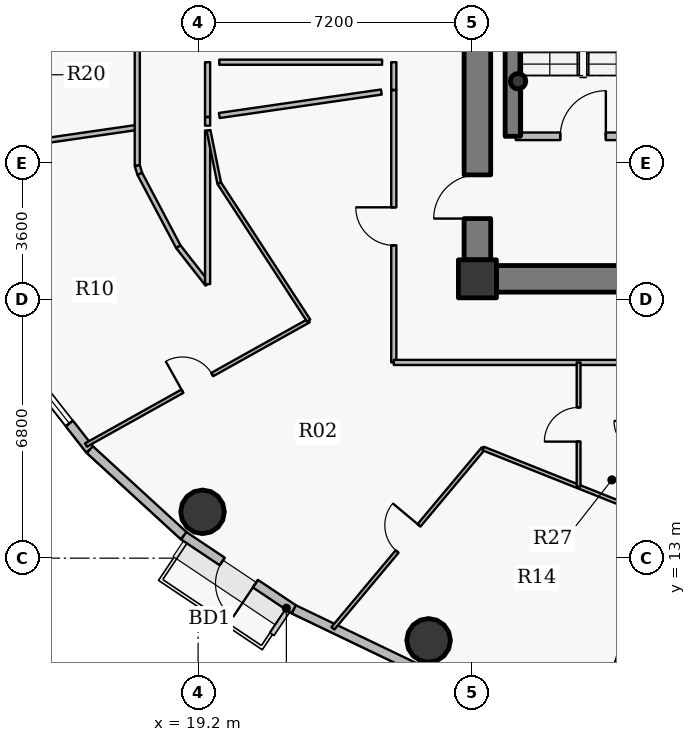
"""IFC4 building model, lengths in metres.
Left out: names, types, materials, properties, quantities, classifications, styles, units other than length and angle.
Written with IfcOpenShell. Run it as: python <this file> out.ifc"""

import sys

from ifc_helpers import new_model, si_unit, direction, frame, frame_2d, origin, origin_2d, place, context, subcontext, project, spatial, rectangle, hollow_circle, extrude, source, transform, mapped, element, fill, save


model = new_model("IFC4")
c1 = context("Model", 3, precision=1e-05, world=origin(), true_north=direction((0.0, 1.0)))
c2 = subcontext(c1, "Body", "Model", "MODEL_VIEW")
j1 = project(units=[si_unit("LENGTHUNIT", "METRE"), si_unit("PLANEANGLEUNIT", "RADIAN")], contexts=[c1])
p1 = place(None, origin())
s1 = spatial("IfcSite", under=j1, at=p1, CompositionType="ELEMENT")
p2 = place(p1, origin())
s2 = spatial("IfcBuilding", under=s1, at=p2, CompositionType="ELEMENT")
p3 = place(p2, frame((0.0, 0.0, 236.55)))
s3 = spatial("IfcBuildingStorey", under=s2, at=p3, CompositionType="ELEMENT", Elevation=236.55)
p4 = place(p3, frame((26.55, 20.35, 0.0), z_axis=(0.0, 0.0, 1.0), x_axis=(1.0, 0.0, 0.0)))
e1 = element("IfcColumn", 1, at=p4, inside=s3, PredefinedType="COLUMN", context=c2, shape_type="SweptSolid", body=[
    extrude(rectangle(XDim=1.0, YDim=1.0, at=origin_2d()), origin(), (0.0, 0.0, 1.0), 3.75),
])
p5 = place(p3, frame((27.48, 24.1, 0.0), z_axis=(0.0, 0.0, 1.0), x_axis=(0.0, 1.0, 0.0)))
e2 = element("IfcWall", 2, at=p5, inside=s3, PredefinedType="SHEAR", context=c2, shape_type="SweptSolid", body=[
    extrude(rectangle(XDim=8.6, YDim=0.4, at=frame_2d((4.3, 0.0))), origin(), (0.0, 0.0, 1.0), 3.75),
])
p6 = place(p3, frame((27.62, 25.55, 0.0), z_axis=(0.0, 0.0, 1.0), x_axis=(1.0, 0.0, 0.0)))
e3 = element("IfcColumn", 3, at=p6, inside=s3, PredefinedType="COLUMN", context=c2, shape_type="SweptSolid", body=[
    extrude(hollow_circle(Radius=0.203, WallThickness=0.016, at=origin_2d()), origin(), (0.0, 0.0, 1.0), 3.75),
])
p7 = place(p3, frame((44.95, 20.35, 0.0), z_axis=(0.0, 0.0, 1.0), x_axis=(-1.0, 0.0, 0.0)))
e4 = element("IfcWall", 4, at=p7, inside=s3, PredefinedType="SHEAR", context=c2, shape_type="SweptSolid", body=[
    extrude(rectangle(XDim=17.9, YDim=0.7, at=frame_2d((8.95, 0.0))), origin(), (0.0, 0.0, 1.0), 3.05),
])
p8 = place(p7, frame((9.7, 0.0, 0.0)))
e5 = element("IfcOpeningElement", 5, at=p8, cuts=e4, PredefinedType="OPENING", context=c2, shape_type="SweptSolid", body=[
    extrude(rectangle(XDim=1.15, YDim=2.15, at=origin_2d()), frame((0.575, 0.36, 1.075), z_axis=(0.0, -1.0, 0.0), x_axis=(1.0, 0.0, 0.0)), (0.0, 0.0, 1.0), 0.72),
])
p9 = place(p3, frame((26.55, 20.85, 0.0), z_axis=(0.0, 0.0, 1.0), x_axis=(0.0, 1.0, 0.0)))
e6 = element("IfcWall", 6, at=p9, inside=s3, PredefinedType="SHEAR", context=c2, shape_type="SweptSolid", body=[
    extrude(rectangle(XDim=12.3, YDim=0.7, at=frame_2d((6.15, 0.0))), origin(), (0.0, 0.0, 1.0), 3.05),
])
p10 = place(p9, frame((1.085, 0.0, 0.0)))
e7 = element("IfcOpeningElement", 7, at=p10, cuts=e6, PredefinedType="OPENING", context=c2, shape_type="SweptSolid", body=[
    extrude(rectangle(XDim=1.15, YDim=2.15, at=origin_2d()), frame((0.575, 0.36, 1.075), z_axis=(0.0, -1.0, 0.0), x_axis=(1.0, 0.0, 0.0)), (0.0, 0.0, 1.0), 0.72),
])
for number, where, z_axis, x_axis in (
    (8, (19.317, 14.219, 0.0), (0.0, 0.0, 1.0), (1.0, 0.0, 0.0)),
    (9, (25.265, 10.836, 0.0), (0.0, 0.0, 1.0), (1.0, 0.0, 0.0)),
):
    element("IfcColumn", number, at=place(p3, frame(where, z_axis=z_axis, x_axis=x_axis)), inside=s3, PredefinedType="COLUMN", context=c2, shape_type="SweptSolid", body=[
        extrude(hollow_circle(Radius=0.575, WallThickness=0.036, at=origin_2d()), origin(), (0.0, 0.0, 1.0), 3.75),
    ])
p11 = place(p3, frame((16.352, 15.855, 0.0), z_axis=(0.0, 0.0, 1.0), x_axis=(-0.616312344705, 0.787501805562, 0.0)))
e10 = element("IfcWall", 10, at=p11, inside=s3, PredefinedType="SOLIDWALL", context=c2, shape_type="SweptSolid", body=[
    extrude(rectangle(XDim=3.225, YDim=0.24, at=frame_2d((1.612, 0.0))), origin(), (0.0, 0.0, 1.0), 3.5),
])
p12 = place(p11, frame((0.876, 0.0, 0.9)))
e11 = element("IfcOpeningElement", 11, at=p12, cuts=e10, PredefinedType="OPENING", context=c2, shape_type="SweptSolid", body=[
    extrude(rectangle(XDim=1.6, YDim=1.75, at=origin_2d()), frame((0.8, 0.13, 0.875), z_axis=(0.0, -1.0, 0.0), x_axis=(1.0, 0.0, 0.0)), (0.0, 0.0, 1.0), 0.26),
])
p13 = place(p3, frame((18.824, 13.589, 0.0), z_axis=(0.0, 0.0, 1.0), x_axis=(-0.737123922599, 0.675757591694, 0.0)))
e12 = element("IfcWall", 12, at=p13, inside=s3, PredefinedType="SOLIDWALL", context=c2, shape_type="SweptSolid", body=[
    extrude(rectangle(XDim=3.354, YDim=0.24, at=frame_2d((1.677, 0.0))), origin(), (0.0, 0.0, 1.0), 3.5),
])
p14 = place(p3, frame((21.72, 11.652, 0.0), z_axis=(0.0, 0.0, 1.0), x_axis=(-0.831262496074, 0.555880079352, 0.0)))
e13 = element("IfcWall", 13, at=p14, inside=s3, PredefinedType="SOLIDWALL", context=c2, shape_type="SweptSolid", body=[
    extrude(rectangle(XDim=3.484, YDim=0.24, at=frame_2d((1.742, 0.0))), origin(), (0.0, 0.0, 1.0), 3.5),
])
p15 = place(p14, frame((1.217, 0.0, 0.0)))
e14 = element("IfcOpeningElement", 14, at=p15, cuts=e13, PredefinedType="OPENING", context=c2, shape_type="SweptSolid", body=[
    extrude(rectangle(XDim=1.05, YDim=2.15, at=origin_2d()), frame((0.525, 0.13, 1.075), z_axis=(0.0, -1.0, 0.0), x_axis=(1.0, 0.0, 0.0)), (0.0, 0.0, 1.0), 0.26),
])
p16 = place(p3, frame((24.969, 10.094, 0.0), z_axis=(0.0, 0.0, 1.0), x_axis=(-0.901598104751, 0.432574684313, 0.0)))
e15 = element("IfcWall", 15, at=p16, inside=s3, PredefinedType="SOLIDWALL", context=c2, shape_type="SweptSolid", body=[
    extrude(rectangle(XDim=3.604, YDim=0.24, at=frame_2d((1.802, 0.0))), origin(), (0.0, 0.0, 1.0), 3.5),
])
p17 = place(p3, frame((12.167, 23.548, 0.0), z_axis=(0.0, 0.0, 1.0), x_axis=(0.989672764262, 0.143345106921, 0.0)))
e16 = element("IfcWall", 16, at=p17, inside=s3, PredefinedType="PARTITIONING", context=c2, shape_type="SweptSolid", body=[
    extrude(rectangle(XDim=5.489, YDim=0.135, at=frame_2d((2.745, 0.0))), origin(), (0.0, 0.0, 1.0), 2.985),
])
p18 = place(p3, frame((16.25, 15.977, 0.0), z_axis=(0.0, 0.0, 1.0), x_axis=(0.87319302211, 0.487374543999, 0.0)))
e17 = element("IfcWall", 17, at=p18, inside=s3, PredefinedType="PARTITIONING", context=c2, shape_type="SweptSolid", body=[
    extrude(rectangle(XDim=6.712, YDim=0.1, at=frame_2d((3.356, 0.0))), origin(), (0.0, 0.0, 1.0), 2.985),
])
p19 = place(p18, frame((2.906, 0.0, 0.0)))
e18 = element("IfcOpeningElement", 18, at=p19, cuts=e17, PredefinedType="OPENING", context=c2, shape_type="SweptSolid", body=[
    extrude(rectangle(XDim=0.9, YDim=2.1, at=origin_2d()), frame((0.45, 0.06, 1.05), z_axis=(0.0, -1.0, 0.0), x_axis=(1.0, 0.0, 0.0)), (0.0, 0.0, 1.0), 0.12),
])
p20 = place(p3, frame((17.6, 23.328, 0.0), z_axis=(0.0, 0.0, 1.0), x_axis=(0.0, 1.0, 0.0)))
e19 = element("IfcWall", 19, at=p20, inside=s3, PredefinedType="PARTITIONING", context=c2, shape_type="SweptSolid", body=[
    extrude(rectangle(XDim=4.622, YDim=0.135, at=frame_2d((2.311, 0.0))), origin(), (0.0, 0.0, 1.0), 2.935),
])
p21 = place(p3, frame((17.6, 23.328, 0.0), z_axis=(0.0, 0.0, 1.0), x_axis=(0.292875000845, -0.956150738053, 0.0)))
e20 = element("IfcWall", 20, at=p21, inside=s3, PredefinedType="PARTITIONING", context=c2, shape_type="SweptSolid", body=[
    extrude(rectangle(XDim=0.227, YDim=0.135, at=frame_2d((0.113, 0.0))), origin(), (0.0, 0.0, 1.0), 3.5),
])
p22 = place(p3, frame((17.667, 23.111, 0.0), z_axis=(0.0, 0.0, 1.0), x_axis=(0.467675622269, -0.883900171024, 0.0)))
e21 = element("IfcWall", 21, at=p22, inside=s3, PredefinedType="PARTITIONING", context=c2, shape_type="SweptSolid", body=[
    extrude(rectangle(XDim=2.168, YDim=0.135, at=frame_2d((1.084, 0.0))), origin(), (0.0, 0.0, 1.0), 2.935),
])
p23 = place(p3, frame((18.681, 21.194, 0.0), z_axis=(0.0, 0.0, 1.0), x_axis=(0.616239706802, -0.787558647823, 0.0)))
e22 = element("IfcWall", 22, at=p23, inside=s3, PredefinedType="PARTITIONING", context=c2, shape_type="SweptSolid", body=[
    extrude(rectangle(XDim=1.248, YDim=0.135, at=frame_2d((0.624, 0.0))), origin(), (0.0, 0.0, 1.0), 3.5),
])
p24 = place(p3, frame((19.45, 20.211, 0.0), z_axis=(0.0, 0.0, 1.0), x_axis=(0.0, 1.0, 0.0)))
e23 = element("IfcWall", 23, at=p24, inside=s3, PredefinedType="PARTITIONING", context=c2, shape_type="SweptSolid", body=[
    extrude(rectangle(XDim=4.042, YDim=0.135, at=frame_2d((2.021, 0.0))), origin(), (0.0, 0.0, 1.0), 2.935),
])
p25 = place(p3, frame((19.45, 24.38, 0.0), z_axis=(0.0, 0.0, 1.0), x_axis=(0.0, 1.0, 0.0)))
e24 = element("IfcWall", 24, at=p25, inside=s3, PredefinedType="PARTITIONING", context=c2, shape_type="SweptSolid", body=[
    extrude(rectangle(XDim=0.223, YDim=0.135, at=frame_2d((0.111, 0.0))), origin(), (0.0, 0.0, 1.0), 3.5),
])
p26 = place(p3, frame((19.475, 24.256, 0.0), z_axis=(0.0, 0.0, 1.0), x_axis=(0.198203790622, -0.980160832406, 0.0)))
e25 = element("IfcWall", 25, at=p26, inside=s3, PredefinedType="PARTITIONING", context=c2, shape_type="SweptSolid", body=[
    extrude(rectangle(XDim=1.417, YDim=0.1, at=frame_2d((0.708, 0.0))), origin(), (0.0, 0.0, 1.0), 2.935),
])
p27 = place(p3, frame((19.756, 22.867, 0.0), z_axis=(0.0, 0.0, 1.0), x_axis=(0.545441385955, -0.83814896915, 0.0)))
e26 = element("IfcWall", 26, at=p27, inside=s3, PredefinedType="PARTITIONING", context=c2, shape_type="SweptSolid", body=[
    extrude(rectangle(XDim=4.318, YDim=0.1, at=frame_2d((2.159, 0.0))), origin(), (0.0, 0.0, 1.0), 2.935),
])
p28 = place(p3, frame((22.747, 11.154, 0.0), z_axis=(0.0, 0.0, 1.0), x_axis=(0.641565789242, 0.767068013982, 0.0)))
e27 = element("IfcWall", 27, at=p28, inside=s3, PredefinedType="PARTITIONING", context=c2, shape_type="SweptSolid", body=[
    extrude(rectangle(XDim=6.167, YDim=0.1, at=frame_2d((3.083, 0.0))), origin(), (0.0, 0.0, 1.0), 2.985),
])
p29 = place(p28, frame((2.633, 0.0, 0.0)))
e28 = element("IfcOpeningElement", 28, at=p29, cuts=e27, PredefinedType="OPENING", context=c2, shape_type="SweptSolid", body=[
    extrude(rectangle(XDim=0.9, YDim=2.1, at=origin_2d()), frame((0.45, 0.06, 1.05), z_axis=(0.0, -1.0, 0.0), x_axis=(1.0, 0.0, 0.0)), (0.0, 0.0, 1.0), 0.12),
])
p30 = place(p3, frame((24.35, 18.15, 0.0), z_axis=(0.0, 0.0, 1.0), x_axis=(0.0, 1.0, 0.0)))
e29 = element("IfcWall", 29, at=p30, inside=s3, PredefinedType="PARTITIONING", context=c2, shape_type="SweptSolid", body=[
    extrude(rectangle(XDim=7.163, YDim=0.135, at=frame_2d((3.581, 0.0))), origin(), (0.0, 0.0, 1.0), 2.935),
])
p31 = place(p30, frame((3.081, 0.0, 0.0)))
e30 = element("IfcOpeningElement", 30, at=p31, cuts=e29, PredefinedType="OPENING", context=c2, shape_type="SweptSolid", body=[
    extrude(rectangle(XDim=1.0, YDim=2.15, at=origin_2d()), frame((0.5, 0.078, 1.075), z_axis=(0.0, -1.0, 0.0), x_axis=(1.0, 0.0, 0.0)), (0.0, 0.0, 1.0), 0.155),
])
p32 = place(p3, frame((24.35, 18.15, 0.0), z_axis=(0.0, 0.0, 1.0), x_axis=(1.0, 0.0, 0.0)))
e31 = element("IfcWall", 31, at=p32, inside=s3, PredefinedType="PARTITIONING", context=c2, shape_type="SweptSolid", body=[
    extrude(rectangle(XDim=23.85, YDim=0.135, at=frame_2d((11.925, 0.0))), origin(), (0.0, 0.0, 1.0), 2.935),
])
p33 = place(p32, frame((14.838, 0.0, 0.0)))
e32 = element("IfcOpeningElement", 32, at=p33, cuts=e31, PredefinedType="OPENING", context=c2, shape_type="SweptSolid", body=[
    extrude(rectangle(XDim=1.0, YDim=2.15, at=origin_2d()), frame((0.5, 0.078, 1.075), z_axis=(0.0, -1.0, 0.0), x_axis=(1.0, 0.0, 0.0)), (0.0, 0.0, 1.0), 0.155),
])
p34 = place(p32, frame((21.472, 0.0, 0.0)))
e33 = element("IfcOpeningElement", 33, at=p34, cuts=e31, PredefinedType="OPENING", context=c2, shape_type="SweptSolid", body=[
    extrude(rectangle(XDim=1.0, YDim=2.15, at=origin_2d()), frame((0.5, 0.078, 1.075), z_axis=(0.0, -1.0, 0.0), x_axis=(1.0, 0.0, 0.0)), (0.0, 0.0, 1.0), 0.155),
])
p35 = place(p3, frame((26.703, 15.884, 0.0), z_axis=(0.0, 0.0, 1.0), x_axis=(0.928807108231, -0.370563564991, 0.0)))
e34 = element("IfcWall", 34, at=p35, inside=s3, PredefinedType="PARTITIONING", context=c2, shape_type="SweptSolid", body=[
    extrude(rectangle(XDim=4.327, YDim=0.1, at=frame_2d((2.163, 0.0))), origin(), (0.0, 0.0, 1.0), 2.935),
])
p36 = place(p3, frame((27.56, 24.1, 0.0), z_axis=(0.0, 0.0, 1.0), x_axis=(1.0, 0.0, 0.0)))
e35 = element("IfcWall", 35, at=p36, inside=s3, PredefinedType="PARTITIONING", context=c2, shape_type="SweptSolid", body=[
    extrude(rectangle(XDim=3.54, YDim=0.2, at=frame_2d((1.77, 0.0))), origin(), (0.0, 0.0, 1.0), 3.5),
])
p37 = place(p36, frame((1.17, 0.0, 0.0)))
e36 = element("IfcOpeningElement", 36, at=p37, cuts=e35, PredefinedType="OPENING", context=c2, shape_type="SweptSolid", body=[
    extrude(rectangle(XDim=1.2, YDim=2.15, at=origin_2d()), frame((0.6, 0.11, 1.075), z_axis=(0.0, -1.0, 0.0), x_axis=(1.0, 0.0, 0.0)), (0.0, 0.0, 1.0), 0.22),
])
p38 = place(p3, frame((29.213, 14.883, 0.0), z_axis=(0.0, 0.0, 1.0), x_axis=(0.0, 1.0, 0.0)))
e37 = element("IfcWall", 37, at=p38, inside=s3, PredefinedType="PARTITIONING", context=c2, shape_type="SweptSolid", body=[
    extrude(rectangle(XDim=3.267, YDim=0.1, at=frame_2d((1.633, 0.0))), origin(), (0.0, 0.0, 1.0), 2.935),
])
p39 = place(p38, frame((1.183, 0.0, 0.0)))
e38 = element("IfcOpeningElement", 38, at=p39, cuts=e37, PredefinedType="OPENING", context=c2, shape_type="SweptSolid", body=[
    extrude(rectangle(XDim=0.9, YDim=2.1, at=origin_2d()), frame((0.45, 0.06, 1.05), z_axis=(0.0, -1.0, 0.0), x_axis=(1.0, 0.0, 0.0)), (0.0, 0.0, 1.0), 0.12),
])
p40 = place(p3, frame((29.711, 8.717, 0.0), z_axis=(0.0, 0.0, 1.0), x_axis=(0.325280852175, 0.945617452889, 0.0)))
e39 = element("IfcWall", 39, at=p40, inside=s3, PredefinedType="PARTITIONING", context=c2, shape_type="SweptSolid", body=[
    extrude(rectangle(XDim=9.976, YDim=0.135, at=frame_2d((4.988, 0.0))), origin(), (0.0, 0.0, 1.0), 2.985),
])
p41 = place(p3, frame((19.45, 26.05, 0.0), z_axis=(0.0, 0.0, 1.0), x_axis=(0.0, -1.0, 0.0)))
e40 = element("IfcWall", 40, at=p41, inside=s3, PredefinedType="PARTITIONING", context=c2, shape_type="SweptSolid", body=[
    extrude(rectangle(XDim=1.437, YDim=0.135, at=frame_2d((0.719, 0.0))), origin(), (0.0, 0.0, 1.0), 3.5),
])
p42 = place(p3, frame((26.2, 20.84, 0.0), z_axis=(0.0, 0.0, 1.0), x_axis=(0.0, -1.0, 0.0)))
e41 = element("IfcWall", 41, at=p42, inside=s3, PredefinedType="PARTITIONING", context=c2, shape_type="SweptSolid", body=[
    extrude(rectangle(XDim=0.84, YDim=0.135, at=frame_2d((0.42, 0.0))), origin(), (0.0, 0.0, 1.0), 3.185),
])
p43 = place(p3, frame((26.508, 20.0, 0.0), z_axis=(0.0, 0.0, 1.0), x_axis=(1.0, 0.0, 0.0)))
e42 = element("IfcWall", 42, at=p43, inside=s3, PredefinedType="PARTITIONING", context=c2, shape_type="SweptSolid", body=[
    extrude(rectangle(XDim=0.532, YDim=0.135, at=frame_2d((0.266, 0.0))), origin(), (0.0, 0.0, 1.0), 2.935),
])
p44 = place(p3, frame((24.35, 25.323, 0.0), z_axis=(0.0, 0.0, 1.0), x_axis=(0.0, 1.0, 0.0)))
e43 = element("IfcWall", 43, at=p44, inside=s3, PredefinedType="PARTITIONING", context=c2, shape_type="SweptSolid", body=[
    extrude(rectangle(XDim=0.728, YDim=0.135, at=frame_2d((0.364, 0.0))), origin(), (0.0, 0.0, 1.0), 3.5),
])
p45 = place(p3, frame((24.042, 26.05, 0.0), z_axis=(0.0, 0.0, 1.0), x_axis=(-1.0, 0.0, 0.0)))
e44 = element("IfcWall", 44, at=p45, inside=s3, PredefinedType="PARTITIONING", context=c2, shape_type="SweptSolid", body=[
    extrude(rectangle(XDim=4.285, YDim=0.135, at=frame_2d((2.143, 0.0))), origin(), (0.0, 0.0, 1.0), 3.5),
])
p46 = place(p3, frame((19.758, 24.647, 0.0), z_axis=(0.0, 0.0, 1.0), x_axis=(0.989666541967, 0.143388059861, 0.0)))
e45 = element("IfcWall", 45, at=p46, inside=s3, PredefinedType="PARTITIONING", context=c2, shape_type="SweptSolid", body=[
    extrude(rectangle(XDim=4.309, YDim=0.135, at=frame_2d((2.155, 0.0))), origin(), (0.0, 0.0, 1.0), 3.5),
])
m1 = source(origin(), c2, "Body", "SweptSolid", [
    extrude(rectangle(XDim=1.6, YDim=1.75, at=origin_2d()), frame((0.8, 0.03, 0.875), z_axis=(0.0, -1.0, 0.0), x_axis=(1.0, 0.0, 0.0)), (0.0, 0.0, 1.0), 0.06),
])
p47 = place(p12, origin())
e46 = element("IfcWindow", 46, at=p47, inside=s3, PartitioningType="DOUBLE_PANEL_VERTICAL", PredefinedType="WINDOW", context=c2, shape_type="MappedRepresentation", body=[
    mapped(m1, transform((0.0, 0.0, 0.0), x_axis=(1.0, 0.0, 0.0), y_axis=(0.0, 1.0, 0.0), z_axis=(0.0, 0.0, 1.0), scale=1.0)),
])
fill(e11, e46)
m2 = source(origin(), c2, "Body", "SweptSolid", [
    extrude(rectangle(XDim=1.05, YDim=2.15, at=origin_2d()), frame((0.525, 0.025, 1.075), z_axis=(0.0, -1.0, 0.0), x_axis=(1.0, 0.0, 0.0)), (0.0, 0.0, 1.0), 0.05),
])
p48 = place(p15, origin())
e47 = element("IfcDoor", 47, at=p48, inside=s3, OperationType="SINGLE_SWING_LEFT", PredefinedType="DOOR", context=c2, shape_type="MappedRepresentation", body=[
    mapped(m2, transform((0.0, 0.0, 0.0), x_axis=(1.0, 0.0, 0.0), y_axis=(0.0, 1.0, 0.0), z_axis=(0.0, 0.0, 1.0), scale=1.0)),
])
fill(e14, e47)
m3 = source(origin(), c2, "Body", "SweptSolid", [
    extrude(rectangle(XDim=1.15, YDim=2.15, at=origin_2d()), frame((0.575, 0.025, 1.075), z_axis=(0.0, -1.0, 0.0), x_axis=(1.0, 0.0, 0.0)), (0.0, 0.0, 1.0), 0.05),
])
p49 = place(p10, origin())
e48 = element("IfcDoor", 48, at=p49, inside=s3, OperationType="SINGLE_SWING_LEFT", PredefinedType="DOOR", context=c2, shape_type="MappedRepresentation", body=[
    mapped(m3, transform((0.0, 0.0, 0.0), x_axis=(1.0, 0.0, 0.0), y_axis=(0.0, 1.0, 0.0), z_axis=(0.0, 0.0, 1.0), scale=1.0)),
])
fill(e7, e48)
m4 = source(origin(), c2, "Body", "SweptSolid", [
    extrude(rectangle(XDim=1.2, YDim=2.15, at=origin_2d()), frame((0.6, 0.025, 1.075), z_axis=(0.0, -1.0, 0.0), x_axis=(1.0, 0.0, 0.0)), (0.0, 0.0, 1.0), 0.05),
])
p50 = place(p37, origin())
e49 = element("IfcDoor", 49, at=p50, inside=s3, OperationType="SINGLE_SWING_RIGHT", PredefinedType="DOOR", context=c2, shape_type="MappedRepresentation", body=[
    mapped(m4, transform((0.0, 0.0, 0.0), x_axis=(1.0, 0.0, 0.0), y_axis=(0.0, 1.0, 0.0), z_axis=(0.0, 0.0, 1.0), scale=1.0)),
])
fill(e36, e49)
m5 = source(origin(), c2, "Body", "SweptSolid", [
    extrude(rectangle(XDim=1.0, YDim=2.15, at=origin_2d()), frame((0.5, 0.025, 1.075), z_axis=(0.0, -1.0, 0.0), x_axis=(1.0, 0.0, 0.0)), (0.0, 0.0, 1.0), 0.05),
])
p51 = place(p31, origin())
e50 = element("IfcDoor", 50, at=p51, inside=s3, OperationType="SINGLE_SWING_RIGHT", PredefinedType="DOOR", context=c2, shape_type="MappedRepresentation", body=[
    mapped(m5, transform((0.0, 0.0, 0.0), x_axis=(1.0, 0.0, 0.0), y_axis=(0.0, 1.0, 0.0), z_axis=(0.0, 0.0, 1.0), scale=1.0)),
])
fill(e30, e50)
m6 = source(origin(), c2, "Body", "SweptSolid", [
    extrude(rectangle(XDim=0.9, YDim=2.1, at=origin_2d()), frame((0.45, 0.025, 1.05), z_axis=(0.0, -1.0, 0.0), x_axis=(1.0, 0.0, 0.0)), (0.0, 0.0, 1.0), 0.05),
])
p52 = place(p19, origin())
e51 = element("IfcDoor", 51, at=p52, inside=s3, OperationType="SINGLE_SWING_LEFT", PredefinedType="DOOR", context=c2, shape_type="MappedRepresentation", body=[
    mapped(m6, transform((0.0, 0.0, 0.0), x_axis=(1.0, 0.0, 0.0), y_axis=(0.0, 1.0, 0.0), z_axis=(0.0, 0.0, 1.0), scale=1.0)),
])
fill(e18, e51)
p53 = place(p29, origin())
e52 = element("IfcDoor", 52, at=p53, inside=s3, OperationType="SINGLE_SWING_RIGHT", PredefinedType="DOOR", context=c2, shape_type="MappedRepresentation", body=[
    mapped(m6, transform((0.0, 0.0, 0.0), x_axis=(1.0, 0.0, 0.0), y_axis=(0.0, 1.0, 0.0), z_axis=(0.0, 0.0, 1.0), scale=1.0)),
])
fill(e28, e52)
p54 = place(p39, origin())
e53 = element("IfcDoor", 53, at=p54, inside=s3, OperationType="SINGLE_SWING_LEFT", PredefinedType="DOOR", context=c2, shape_type="MappedRepresentation", body=[
    mapped(m6, transform((0.0, 0.0, 0.0), x_axis=(1.0, 0.0, 0.0), y_axis=(0.0, 1.0, 0.0), z_axis=(0.0, 0.0, 1.0), scale=1.0)),
])
fill(e38, e53)
save(model, sys.argv[1])
